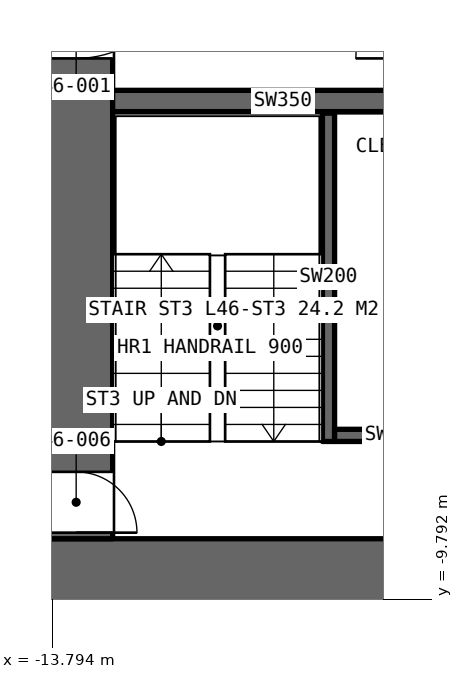
"""IFC4 building model, lengths in metres.
Left out: names, types, materials, properties, quantities, classifications, styles, units other than length and angle.
Written with IfcOpenShell. Run it as: python <this file> out.ifc"""

import sys

from ifc_helpers import new_model, si_unit, direction, frame, frame_2d, origin, place, context, subcontext, project, spatial, rectangle, extrude, element, fill, save


model = new_model("IFC4")
c1 = context("Model", 3, precision=1e-05, world=origin(), true_north=direction((0.0, 1.0)))
c2 = subcontext(c1, "Body", "Model", "MODEL_VIEW")
j1 = project(units=[si_unit("LENGTHUNIT", "METRE"), si_unit("PLANEANGLEUNIT", "RADIAN")], contexts=[c1])
p1 = place(None, origin())
s1 = spatial("IfcSite", under=j1, at=p1, CompositionType="ELEMENT")
p2 = place(p1, origin())
s2 = spatial("IfcBuilding", under=s1, at=p2, CompositionType="ELEMENT")
p3 = place(p2, frame((0.0, 0.0, 211.6)))
s3 = spatial("IfcBuildingStorey", under=s2, at=p3, CompositionType="ELEMENT", Elevation=211.6)
p4 = place(p3, frame((-14.0, -9.4, 0.0), z_axis=(0.0, 0.0, 1.0), x_axis=(1.0, 0.0, 0.0)))
e1 = element("IfcWall", 1, at=p4, inside=s3, PredefinedType="SHEAR", context=c2, shape_type="SweptSolid", body=[
    extrude(rectangle(XDim=28.0, YDim=1.2, at=frame_2d((14.0, 0.0))), origin(), (0.0, 0.0, 1.0), 4.2),
])
p5 = place(p4, frame((22.9, 0.0, 0.0)))
e2 = element("IfcOpeningElement", 2, at=p5, cuts=e1, PredefinedType="OPENING", context=c2, shape_type="SweptSolid", body=[
    extrude(rectangle(XDim=2.2, YDim=2.7, at=frame_2d((1.1, 1.35))), frame((0.0, 0.61, 0.0), z_axis=(0.0, -1.0, 0.0), x_axis=(1.0, 0.0, 0.0)), (0.0, 0.0, 1.0), 1.22),
])
p6 = place(p3, frame((-13.4, 8.8, 0.0), z_axis=(0.0, 0.0, 1.0), x_axis=(0.0, -1.0, 0.0)))
e3 = element("IfcWall", 3, at=p6, inside=s3, PredefinedType="SHEAR", context=c2, shape_type="SweptSolid", body=[
    extrude(rectangle(XDim=17.6, YDim=1.2, at=frame_2d((8.8, 0.0))), origin(), (0.0, 0.0, 1.0), 4.2),
])
p7 = place(p6, frame((7.9, 0.0, 0.0)))
e4 = element("IfcOpeningElement", 4, at=p7, cuts=e3, PredefinedType="OPENING", context=c2, shape_type="SweptSolid", body=[
    extrude(rectangle(XDim=1.8, YDim=2.4, at=frame_2d((0.9, 1.2))), frame((0.0, 0.61, 0.0), z_axis=(0.0, -1.0, 0.0), x_axis=(1.0, 0.0, 0.0)), (0.0, 0.0, 1.0), 1.22),
])
p8 = place(p6, frame((16.5, 0.0, 0.0)))
e5 = element("IfcOpeningElement", 5, at=p8, cuts=e3, PredefinedType="OPENING", context=c2, shape_type="SweptSolid", body=[
    extrude(rectangle(XDim=1.0, YDim=2.4, at=frame_2d((0.5, 1.2))), frame((0.0, 0.61, 0.0), z_axis=(0.0, -1.0, 0.0), x_axis=(1.0, 0.0, 0.0)), (0.0, 0.0, 1.0), 1.22),
])
p9 = place(p3, frame((-12.8, -1.6, 0.0), z_axis=(0.0, 0.0, 1.0), x_axis=(1.0, 0.0, 0.0)))
e6 = element("IfcWall", 6, at=p9, inside=s3, PredefinedType="SHEAR", context=c2, shape_type="SweptSolid", body=[
    extrude(rectangle(XDim=5.6, YDim=0.35, at=frame_2d((2.8, 0.0))), origin(), (0.0, 0.0, 1.0), 4.2),
])
p10 = place(p3, frame((-9.25, -7.2, 0.0), z_axis=(0.0, 0.0, 1.0), x_axis=(0.0, 1.0, 0.0)))
e7 = element("IfcWall", 7, at=p10, inside=s3, PredefinedType="SOLIDWALL", context=c2, shape_type="SweptSolid", body=[
    extrude(rectangle(XDim=5.4, YDim=0.2, at=frame_2d((2.7, 0.0))), origin(), (0.0, 0.0, 1.0), 4.2),
])
p11 = place(p3, frame((-9.15, -7.1, 0.0), z_axis=(0.0, 0.0, 1.0), x_axis=(1.0, 0.0, 0.0)))
e8 = element("IfcWall", 8, at=p11, inside=s3, PredefinedType="SOLIDWALL", context=c2, shape_type="SweptSolid", body=[
    extrude(rectangle(XDim=1.95, YDim=0.2, at=frame_2d((0.975, 0.0))), origin(), (0.0, 0.0, 1.0), 4.2),
])
p12 = place(p7, origin())
e9 = element("IfcDoor", 9, at=p12, inside=s3, OperationType="DOUBLE_DOOR_SINGLE_SWING", PredefinedType="DOOR", context=c2, shape_type="SweptSolid", body=[
    extrude(rectangle(XDim=1.8, YDim=2.4, at=frame_2d((0.9, 1.2))), frame((0.0, 0.025, 0.0), z_axis=(0.0, -1.0, 0.0), x_axis=(1.0, 0.0, 0.0)), (0.0, 0.0, 1.0), 0.05),
])
fill(e4, e9)
p13 = place(p8, origin())
e10 = element("IfcDoor", 10, at=p13, inside=s3, OperationType="SINGLE_SWING_RIGHT", PredefinedType="DOOR", context=c2, shape_type="SweptSolid", body=[
    extrude(rectangle(XDim=1.0, YDim=2.4, at=frame_2d((0.5, 1.2))), frame((0.0, 0.025, 0.0), z_axis=(0.0, -1.0, 0.0), x_axis=(1.0, 0.0, 0.0)), (0.0, 0.0, 1.0), 0.05),
])
fill(e5, e10)
save(model, sys.argv[1])
